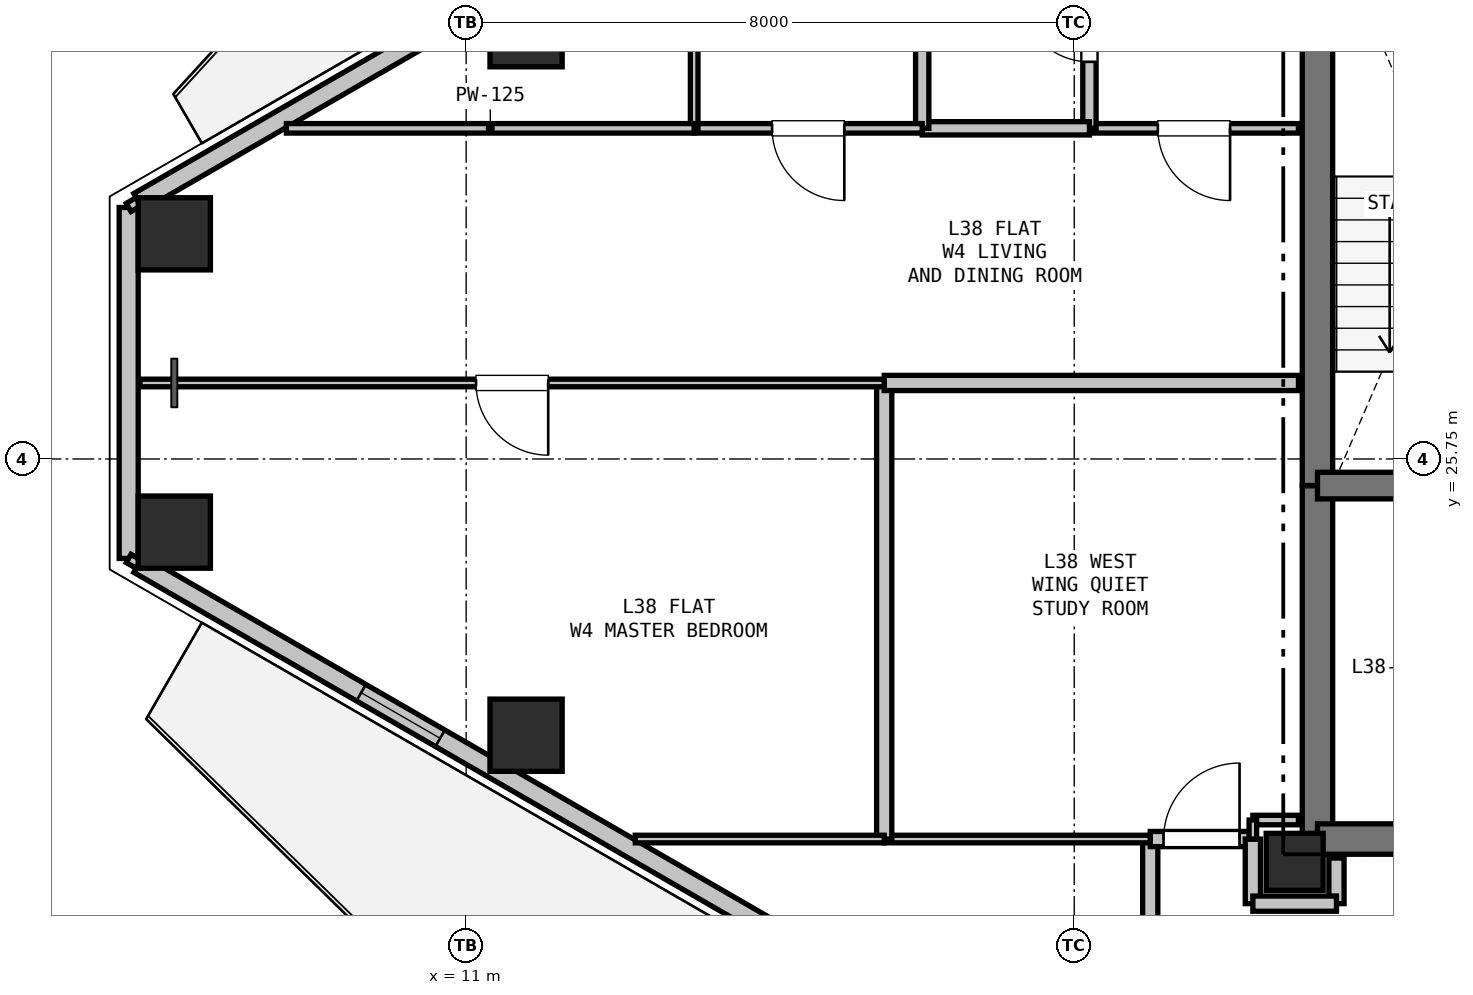
"""IFC4 building model, lengths in metres.
Left out: names, types, materials, properties, quantities, classifications, styles, units other than length and angle.
Written with IfcOpenShell. Run it as: python <this file> out.ifc"""

import sys

from ifc_helpers import new_model, si_unit, direction, frame, frame_2d, origin, origin_2d, place, context, subcontext, project, spatial, rectangle, hollow_rectangle, extrude, element, fill, save


model = new_model("IFC4")
c1 = context("Model", 3, precision=1e-05, world=origin(), true_north=direction((0.0, 1.0)))
c2 = subcontext(c1, "Body", "Model", "MODEL_VIEW")
j1 = project(units=[si_unit("LENGTHUNIT", "METRE"), si_unit("PLANEANGLEUNIT", "RADIAN")], contexts=[c1])
p1 = place(None, origin())
s1 = spatial("IfcSite", under=j1, at=p1, CompositionType="ELEMENT")
p2 = place(p1, origin())
s2 = spatial("IfcBuilding", under=s1, at=p2, CompositionType="ELEMENT")
p3 = place(p2, frame((0.0, 0.0, 137.7)))
s3 = spatial("IfcBuildingStorey", under=s2, at=p3, CompositionType="ELEMENT", Elevation=137.7)
p4 = place(p3, frame((21.9, 20.45, 0.0), z_axis=(0.0, 0.0, 1.0), x_axis=(1.0, 0.0, 0.0)))
e1 = element("IfcColumn", 1, at=p4, inside=s3, PredefinedType="COLUMN", context=c2, shape_type="SweptSolid", body=[
    extrude(rectangle(XDim=0.75, YDim=0.75, at=origin_2d()), origin(), (0.0, 0.0, 1.0), 3.3),
])
for number, where, z_axis, x_axis in (
    (2, (7.16, 28.712, 0.0), (0.0, 0.0, 1.0), (1.0, 0.0, 0.0)),
    (3, (11.788, 31.384, 0.0), (0.0, 0.0, 1.0), (1.0, 0.0, 0.0)),
    (4, (11.788, 22.116, 0.0), (0.0, 0.0, 1.0), (1.0, 0.0, 0.0)),
    (5, (7.16, 24.788, 0.0), (0.0, 0.0, 1.0), (1.0, 0.0, 0.0)),
):
    element("IfcColumn", number, at=place(p3, frame(where, z_axis=z_axis, x_axis=x_axis)), inside=s3, PredefinedType="COLUMN", context=c2, shape_type="SweptSolid", body=[
        extrude(hollow_rectangle(XDim=0.95, YDim=0.95, WallThickness=0.028, at=origin_2d()), origin(), (0.0, 0.0, 1.0), 3.3),
    ])
p5 = place(p3, frame((6.56, 24.441, 0.0), z_axis=(0.0, 0.0, 1.0), x_axis=(0.0, 1.0, 0.0)))
e6 = element("IfcWall", 6, at=p5, inside=s3, PredefinedType="SOLIDWALL", context=c2, shape_type="SweptSolid", body=[
    extrude(rectangle(XDim=4.617, YDim=0.25, at=frame_2d((2.309, 0.0))), origin(), (0.0, 0.0, 1.0), 2.68),
])
p6 = place(p3, frame((6.69, 29.134, 0.0), z_axis=(0.0, 0.0, 1.0), x_axis=(0.866027848477, 0.499995765644, 0.0)))
e7 = element("IfcWall", 7, at=p6, inside=s3, PredefinedType="SOLIDWALL", context=c2, shape_type="SweptSolid", body=[
    extrude(rectangle(XDim=11.186, YDim=0.25, at=frame_2d((5.593, 0.0))), origin(), (0.0, 0.0, 1.0), 2.68),
])
p7 = place(p6, frame((9.122, 0.0, 0.0)))
e8 = element("IfcOpeningElement", 8, at=p7, cuts=e7, PredefinedType="OPENING", context=c2, shape_type="SweptSolid", body=[
    extrude(rectangle(XDim=1.0, YDim=2.1, at=frame_2d((0.5, 1.05))), frame((0.0, 0.135, 0.0), z_axis=(0.0, -1.0, 0.0), x_axis=(1.0, 0.0, 0.0)), (0.0, 0.0, 1.0), 0.27),
])
p8 = place(p3, frame((16.378, 18.773, 0.0), z_axis=(0.0, 0.0, 1.0), x_axis=(-0.866027848477, 0.499995765644, 0.0)))
e9 = element("IfcWall", 9, at=p8, inside=s3, PredefinedType="SOLIDWALL", context=c2, shape_type="SweptSolid", body=[
    extrude(rectangle(XDim=11.186, YDim=0.25, at=frame_2d((5.593, 0.0))), origin(), (0.0, 0.0, 1.0), 2.68),
])
p9 = place(p8, frame((6.605, 0.0, 0.9)))
e10 = element("IfcOpeningElement", 10, at=p9, cuts=e9, PredefinedType="OPENING", context=c2, shape_type="SweptSolid", body=[
    extrude(rectangle(XDim=1.2, YDim=1.4, at=frame_2d((0.6, 0.7))), frame((0.0, 0.135, 0.0), z_axis=(0.0, -1.0, 0.0), x_axis=(1.0, 0.0, 0.0)), (0.0, 0.0, 1.0), 0.27),
])
p10 = place(p3, frame((22.2, 20.75, 0.0), z_axis=(0.0, 0.0, 1.0), x_axis=(0.0, 1.0, 0.0)))
e11 = element("IfcWall", 11, at=p10, inside=s3, PredefinedType="SHEAR", context=c2, shape_type="SweptSolid", body=[
    extrude(rectangle(XDim=4.65, YDim=0.4, at=frame_2d((2.325, 0.0))), origin(), (0.0, 0.0, 1.0), 3.06),
])
p11 = place(p3, frame((22.2, 25.4, 0.0), z_axis=(0.0, 0.0, 1.0), x_axis=(0.0, 1.0, 0.0)))
e12 = element("IfcWall", 12, at=p11, inside=s3, PredefinedType="SHEAR", context=c2, shape_type="SweptSolid", body=[
    extrude(rectangle(XDim=7.35, YDim=0.4, at=frame_2d((3.675, 0.0))), origin(), (0.0, 0.0, 1.0), 3.06),
])
p12 = place(p3, frame((25.65, 20.75, 0.0), z_axis=(0.0, 0.0, 1.0), x_axis=(-1.0, 0.0, 0.0)))
e13 = element("IfcWall", 13, at=p12, inside=s3, PredefinedType="SHEAR", context=c2, shape_type="SweptSolid", body=[
    extrude(rectangle(XDim=3.45, YDim=0.4, at=frame_2d((1.725, 0.0))), origin(), (0.0, 0.0, 1.0), 3.06),
])
p13 = place(p12, frame((0.65, 0.0, 0.0)))
e14 = element("IfcOpeningElement", 14, at=p13, cuts=e13, PredefinedType="OPENING", context=c2, shape_type="SweptSolid", body=[
    extrude(rectangle(XDim=1.15, YDim=2.15, at=frame_2d((0.575, 1.075))), frame((0.0, 0.21, 0.0), z_axis=(0.0, -1.0, 0.0), x_axis=(1.0, 0.0, 0.0)), (0.0, 0.0, 1.0), 0.42),
])
p14 = place(p3, frame((22.2, 25.4, 0.0), z_axis=(0.0, 0.0, 1.0), x_axis=(1.0, 0.0, 0.0)))
e15 = element("IfcWall", 15, at=p14, inside=s3, PredefinedType="SHEAR", context=c2, shape_type="SweptSolid", body=[
    extrude(rectangle(XDim=3.45, YDim=0.35, at=frame_2d((1.725, 0.0))), origin(), (0.0, 0.0, 1.0), 3.06),
])
p15 = place(p14, frame((1.15, 0.0, 0.0)))
e16 = element("IfcOpeningElement", 16, at=p15, cuts=e15, PredefinedType="OPENING", context=c2, shape_type="SweptSolid", body=[
    extrude(rectangle(XDim=1.15, YDim=2.15, at=frame_2d((0.575, 1.075))), frame((0.0, 0.185, 0.0), z_axis=(0.0, -1.0, 0.0), x_axis=(1.0, 0.0, 0.0)), (0.0, 0.0, 1.0), 0.37),
])
p16 = place(p3, frame((22.45, 19.9, 0.0), z_axis=(0.0, 0.0, 1.0), x_axis=(0.0, 1.0, 0.0)))
e17 = element("IfcWall", 17, at=p16, inside=s3, PredefinedType="PARTITIONING", context=c2, shape_type="SweptSolid", body=[
    extrude(rectangle(XDim=0.6, YDim=0.2, at=frame_2d((0.3, 0.0))), origin(), (0.0, 0.0, 1.0), 2.433),
])
p17 = place(p3, frame((20.0, 18.15, 0.0), z_axis=(0.0, 0.0, 1.0), x_axis=(0.0, 1.0, 0.0)))
e18 = element("IfcWall", 18, at=p17, inside=s3, PredefinedType="PARTITIONING", context=c2, shape_type="SweptSolid", body=[
    extrude(rectangle(XDim=2.6, YDim=0.2, at=frame_2d((1.3, 0.0))), origin(), (0.0, 0.0, 1.0), 3.06),
])
p18 = place(p3, frame((20.0, 20.75, 0.0), z_axis=(0.0, 0.0, 1.0), x_axis=(1.0, 0.0, 0.0)))
e19 = element("IfcWall", 19, at=p18, inside=s3, PredefinedType="PARTITIONING", context=c2, shape_type="SweptSolid", body=[
    extrude(rectangle(XDim=1.35, YDim=0.2, at=frame_2d((0.675, 0.0))), origin(), (0.0, 0.0, 1.0), 2.433),
])
p19 = place(p18, frame((0.175, 0.0, 0.0)))
e20 = element("IfcOpeningElement", 20, at=p19, cuts=e19, PredefinedType="OPENING", context=c2, shape_type="SweptSolid", body=[
    extrude(rectangle(XDim=1.0, YDim=2.15, at=frame_2d((0.5, 1.075))), frame((0.0, 0.11, 0.0), z_axis=(0.0, -1.0, 0.0), x_axis=(1.0, 0.0, 0.0)), (0.0, 0.0, 1.0), 0.22),
])
p20 = place(p3, frame((21.35, 20.75, 0.0), z_axis=(0.0, 0.0, 1.0), x_axis=(0.0, -1.0, 0.0)))
e21 = element("IfcWall", 21, at=p20, inside=s3, PredefinedType="PARTITIONING", context=c2, shape_type="SweptSolid", body=[
    extrude(rectangle(XDim=0.85, YDim=0.2, at=frame_2d((0.425, 0.0))), origin(), (0.0, 0.0, 1.0), 2.433),
])
p21 = place(p3, frame((21.35, 19.9, 0.0), z_axis=(0.0, 0.0, 1.0), x_axis=(1.0, 0.0, 0.0)))
e22 = element("IfcWall", 22, at=p21, inside=s3, PredefinedType="PARTITIONING", context=c2, shape_type="SweptSolid", body=[
    extrude(rectangle(XDim=1.1, YDim=0.2, at=frame_2d((0.55, 0.0))), origin(), (0.0, 0.0, 1.0), 2.433),
])
p22 = place(p3, frame((21.95, 30.1, 0.0), z_axis=(0.0, 0.0, 1.0), x_axis=(-1.0, 0.0, 0.0)))
e23 = element("IfcWall", 23, at=p22, inside=s3, PredefinedType="PARTITIONING", context=c2, shape_type="SweptSolid", body=[
    extrude(rectangle(XDim=2.75, YDim=0.125, at=frame_2d((1.375, 0.0))), origin(), (0.0, 0.0, 1.0), 2.508),
])
p23 = place(p22, frame((0.9, 0.0, 0.0)))
e24 = element("IfcOpeningElement", 24, at=p23, cuts=e23, PredefinedType="OPENING", context=c2, shape_type="SweptSolid", body=[
    extrude(rectangle(XDim=0.95, YDim=2.1, at=frame_2d((0.475, 1.05))), frame((0.0, 0.073, 0.0), z_axis=(0.0, -1.0, 0.0), x_axis=(1.0, 0.0, 0.0)), (0.0, 0.0, 1.0), 0.145),
])
p24 = place(p3, frame((19.2, 30.1, 0.0), z_axis=(0.0, 0.0, 1.0), x_axis=(0.0, 1.0, 0.0)))
e25 = element("IfcWall", 25, at=p24, inside=s3, PredefinedType="PLUMBINGWALL", context=c2, shape_type="SweptSolid", body=[
    extrude(rectangle(XDim=2.65, YDim=0.175, at=frame_2d((1.325, 0.0))), origin(), (0.0, 0.0, 1.0), 2.433),
])
p25 = place(p24, frame((0.875, 0.0, 0.0)))
e26 = element("IfcOpeningElement", 26, at=p25, cuts=e25, PredefinedType="OPENING", context=c2, shape_type="SweptSolid", body=[
    extrude(rectangle(XDim=0.9, YDim=2.1, at=frame_2d((0.45, 1.05))), frame((0.0, 0.097, 0.0), z_axis=(0.0, -1.0, 0.0), x_axis=(1.0, 0.0, 0.0)), (0.0, 0.0, 1.0), 0.195),
])
p26 = place(p3, frame((19.2, 30.1, 0.0), z_axis=(0.0, 0.0, 1.0), x_axis=(-1.0, 0.0, 0.0)))
e27 = element("IfcWall", 27, at=p26, inside=s3, PredefinedType="PLUMBINGWALL", context=c2, shape_type="SweptSolid", body=[
    extrude(rectangle(XDim=2.2, YDim=0.175, at=frame_2d((1.1, 0.0))), origin(), (0.0, 0.0, 1.0), 3.06),
])
p27 = place(p3, frame((17.0, 30.1, 0.0), z_axis=(0.0, 0.0, 1.0), x_axis=(0.0, 1.0, 0.0)))
e28 = element("IfcWall", 28, at=p27, inside=s3, PredefinedType="PLUMBINGWALL", context=c2, shape_type="SweptSolid", body=[
    extrude(rectangle(XDim=2.65, YDim=0.175, at=frame_2d((1.325, 0.0))), origin(), (0.0, 0.0, 1.0), 2.433),
])
p28 = place(p3, frame((17.0, 30.1, 0.0), z_axis=(0.0, 0.0, 1.0), x_axis=(-1.0, 0.0, 0.0)))
e29 = element("IfcWall", 29, at=p28, inside=s3, PredefinedType="PARTITIONING", context=c2, shape_type="SweptSolid", body=[
    extrude(rectangle(XDim=3.0, YDim=0.125, at=frame_2d((1.5, 0.0))), origin(), (0.0, 0.0, 1.0), 3.06),
])
p29 = place(p28, frame((1.025, 0.0, 0.0)))
e30 = element("IfcOpeningElement", 30, at=p29, cuts=e29, PredefinedType="OPENING", context=c2, shape_type="SweptSolid", body=[
    extrude(rectangle(XDim=0.95, YDim=2.1, at=frame_2d((0.475, 1.05))), frame((0.0, 0.073, 0.0), z_axis=(0.0, -1.0, 0.0), x_axis=(1.0, 0.0, 0.0)), (0.0, 0.0, 1.0), 0.145),
])
p30 = place(p3, frame((14.0, 30.1, 0.0), z_axis=(0.0, 0.0, 1.0), x_axis=(0.0, 1.0, 0.0)))
e31 = element("IfcWall", 31, at=p30, inside=s3, PredefinedType="PARTITIONING", context=c2, shape_type="SweptSolid", body=[
    extrude(rectangle(XDim=3.082, YDim=0.1, at=frame_2d((1.541, 0.0))), origin(), (0.0, 0.0, 1.0), 2.365),
])
p31 = place(p3, frame((20.0, 20.75, 0.0), z_axis=(0.0, 0.0, 1.0), x_axis=(-1.0, 0.0, 0.0)))
e32 = element("IfcWall", 32, at=p31, inside=s3, PredefinedType="PARTITIONING", context=c2, shape_type="SweptSolid", body=[
    extrude(rectangle(XDim=3.5, YDim=0.1, at=frame_2d((1.75, 0.0))), origin(), (0.0, 0.0, 1.0), 3.06),
])
p32 = place(p3, frame((16.5, 20.75, 0.0), z_axis=(0.0, 0.0, 1.0), x_axis=(0.0, 1.0, 0.0)))
e33 = element("IfcWall", 33, at=p32, inside=s3, PredefinedType="PARTITIONING", context=c2, shape_type="SweptSolid", body=[
    extrude(rectangle(XDim=6.0, YDim=0.2, at=frame_2d((3.0, 0.0))), origin(), (0.0, 0.0, 1.0), 2.433),
])
p33 = place(p3, frame((16.5, 26.75, 0.0), z_axis=(0.0, 0.0, 1.0), x_axis=(1.0, 0.0, 0.0)))
e34 = element("IfcWall", 34, at=p33, inside=s3, PredefinedType="PARTITIONING", context=c2, shape_type="SweptSolid", body=[
    extrude(rectangle(XDim=5.45, YDim=0.2, at=frame_2d((2.725, 0.0))), origin(), (0.0, 0.0, 1.0), 2.508),
])
p34 = place(p3, frame((21.95, 21.0, 0.0), z_axis=(0.0, 0.0, 1.0), x_axis=(-1.0, 0.0, 0.0)))
e35 = element("IfcWall", 35, at=p34, inside=s3, PredefinedType="PARTITIONING", context=c2, shape_type="SweptSolid", body=[
    extrude(rectangle(XDim=0.6, YDim=0.125, at=frame_2d((0.3, 0.0))), origin(), (0.0, 0.0, 1.0), 2.508),
])
p35 = place(p3, frame((21.35, 21.0, 0.0), z_axis=(0.0, 0.0, 1.0), x_axis=(0.0, -1.0, 0.0)))
e36 = element("IfcWall", 36, at=p35, inside=s3, PredefinedType="PARTITIONING", context=c2, shape_type="SweptSolid", body=[
    extrude(rectangle(XDim=0.25, YDim=0.1, at=frame_2d((0.125, 0.0))), origin(), (0.0, 0.0, 1.0), 3.06),
])
p36 = place(p3, frame((8.635, 30.1, 0.0), z_axis=(0.0, 0.0, 1.0), x_axis=(1.0, 0.0, 0.0)))
e37 = element("IfcWall", 37, at=p36, inside=s3, PredefinedType="PARTITIONING", context=c2, shape_type="SweptSolid", body=[
    extrude(rectangle(XDim=5.365, YDim=0.125, at=frame_2d((2.683, 0.0))), origin(), (0.0, 0.0, 1.0), 2.725),
])
p37 = place(p3, frame((16.5, 26.75, 0.0), z_axis=(0.0, 0.0, 1.0), x_axis=(-1.0, 0.0, 0.0)))
e38 = element("IfcWall", 38, at=p37, inside=s3, PredefinedType="PARTITIONING", context=c2, shape_type="SweptSolid", body=[
    extrude(rectangle(XDim=9.791, YDim=0.1, at=frame_2d((4.896, 0.0))), origin(), (0.0, 0.0, 1.0), 2.725),
])
p38 = place(p37, frame((4.42, 0.0, 0.0)))
e39 = element("IfcOpeningElement", 39, at=p38, cuts=e38, PredefinedType="OPENING", context=c2, shape_type="SweptSolid", body=[
    extrude(rectangle(XDim=0.95, YDim=2.1, at=frame_2d((0.475, 1.05))), frame((0.0, 0.06, 0.0), z_axis=(0.0, -1.0, 0.0), x_axis=(1.0, 0.0, 0.0)), (0.0, 0.0, 1.0), 0.12),
])
p39 = place(p3, frame((6.56, 29.059, 0.0), z_axis=(0.0, 0.0, 1.0), x_axis=(0.866131372301, 0.499816412211, 0.0)))
e40 = element("IfcWall", 40, at=p39, inside=s3, PredefinedType="PARTITIONING", context=c2, shape_type="SweptSolid", body=[
    extrude(rectangle(XDim=0.15, YDim=0.125, at=frame_2d((0.075, 0.0))), origin(), (0.0, 0.0, 1.0), 3.06),
])
p40 = place(p3, frame((16.5, 20.75, 0.0), z_axis=(0.0, 0.0, 1.0), x_axis=(-1.0, 0.0, 0.0)))
e41 = element("IfcWall", 41, at=p40, inside=s3, PredefinedType="PARTITIONING", context=c2, shape_type="SweptSolid", body=[
    extrude(rectangle(XDim=3.275, YDim=0.1, at=frame_2d((1.638, 0.0))), origin(), (0.0, 0.0, 1.0), 2.365),
])
p41 = place(p3, frame((6.69, 24.366, 0.0), z_axis=(0.0, 0.0, 1.0), x_axis=(-0.866131372301, 0.499816412211, 0.0)))
e42 = element("IfcWall", 42, at=p41, inside=s3, PredefinedType="PARTITIONING", context=c2, shape_type="SweptSolid", body=[
    extrude(rectangle(XDim=0.15, YDim=0.125, at=frame_2d((0.075, 0.0))), origin(), (0.0, 0.0, 1.0), 3.06),
])
p42 = place(p9, origin())
e43 = element("IfcWindow", 43, at=p42, inside=s3, PartitioningType="SINGLE_PANEL", PredefinedType="WINDOW", context=c2, shape_type="SweptSolid", body=[
    extrude(rectangle(XDim=1.2, YDim=1.4, at=frame_2d((0.6, 0.7))), frame((0.0, 0.03, 0.0), z_axis=(0.0, -1.0, 0.0), x_axis=(1.0, 0.0, 0.0)), (0.0, 0.0, 1.0), 0.06),
])
fill(e10, e43)
p43 = place(p19, origin())
e44 = element("IfcDoor", 44, at=p43, inside=s3, OperationType="SINGLE_SWING_RIGHT", PredefinedType="DOOR", context=c2, shape_type="SweptSolid", body=[
    extrude(rectangle(XDim=1.0, YDim=2.15, at=frame_2d((0.5, 1.075))), frame((0.0, 0.025, 0.0), z_axis=(0.0, -1.0, 0.0), x_axis=(1.0, 0.0, 0.0)), (0.0, 0.0, 1.0), 0.05),
])
fill(e20, e44)
p44 = place(p25, origin())
e45 = element("IfcDoor", 45, at=p44, inside=s3, OperationType="SINGLE_SWING_RIGHT", PredefinedType="DOOR", context=c2, shape_type="SweptSolid", body=[
    extrude(rectangle(XDim=0.9, YDim=2.1, at=frame_2d((0.45, 1.05))), frame((0.0, 0.025, 0.0), z_axis=(0.0, -1.0, 0.0), x_axis=(1.0, 0.0, 0.0)), (0.0, 0.0, 1.0), 0.05),
])
fill(e26, e45)
p45 = place(p23, origin())
e46 = element("IfcDoor", 46, at=p45, inside=s3, OperationType="SINGLE_SWING_LEFT", PredefinedType="DOOR", context=c2, shape_type="SweptSolid", body=[
    extrude(rectangle(XDim=0.95, YDim=2.1, at=frame_2d((0.475, 1.05))), frame((0.0, 0.025, 0.0), z_axis=(0.0, -1.0, 0.0), x_axis=(1.0, 0.0, 0.0)), (0.0, 0.0, 1.0), 0.05),
])
fill(e24, e46)
p46 = place(p29, origin())
e47 = element("IfcDoor", 47, at=p46, inside=s3, OperationType="SINGLE_SWING_LEFT", PredefinedType="DOOR", context=c2, shape_type="SweptSolid", body=[
    extrude(rectangle(XDim=0.95, YDim=2.1, at=frame_2d((0.475, 1.05))), frame((0.0, 0.025, 0.0), z_axis=(0.0, -1.0, 0.0), x_axis=(1.0, 0.0, 0.0)), (0.0, 0.0, 1.0), 0.05),
])
fill(e30, e47)
p47 = place(p38, origin())
e48 = element("IfcDoor", 48, at=p47, inside=s3, OperationType="SINGLE_SWING_LEFT", PredefinedType="DOOR", context=c2, shape_type="SweptSolid", body=[
    extrude(rectangle(XDim=0.95, YDim=2.1, at=frame_2d((0.475, 1.05))), frame((0.0, 0.025, 0.0), z_axis=(0.0, -1.0, 0.0), x_axis=(1.0, 0.0, 0.0)), (0.0, 0.0, 1.0), 0.05),
])
fill(e39, e48)
save(model, sys.argv[1])
